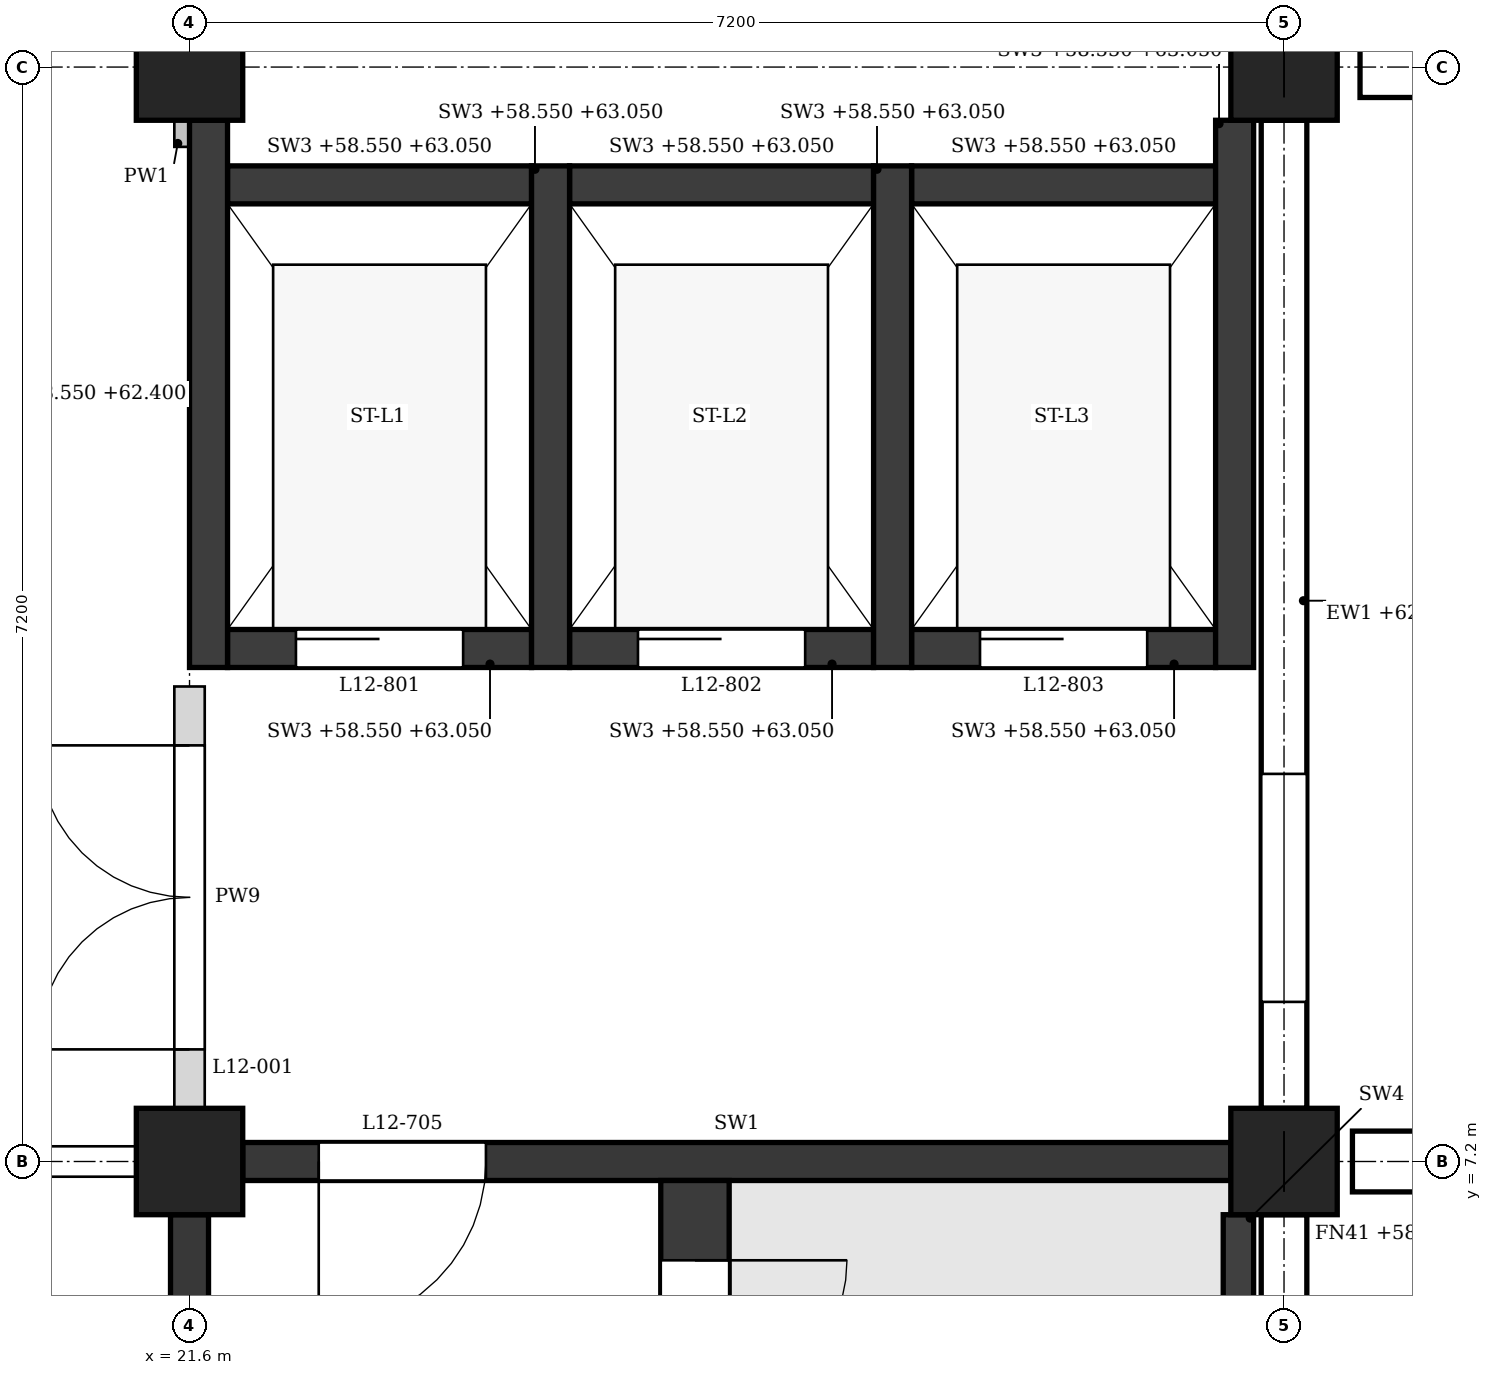
"""IFC4 building model, lengths in metres.
Left out: names, types, materials, properties, quantities, classifications, styles, units other than length and angle.
Written with IfcOpenShell. Run it as: python <this file> out.ifc"""

import sys

from ifc_helpers import new_model, si_unit, direction, frame, frame_2d, origin, origin_2d, place, context, subcontext, project, spatial, polyline, rectangle, outline, extrude, element, fill, save


model = new_model("IFC4")
c1 = context("Model", 3, precision=1e-05, world=origin(), true_north=direction((0.0, 1.0)))
c2 = subcontext(c1, "Body", "Model", "MODEL_VIEW")
j1 = project(units=[si_unit("LENGTHUNIT", "METRE"), si_unit("PLANEANGLEUNIT", "RADIAN")], contexts=[c1])
p1 = place(None, origin())
s1 = spatial("IfcSite", under=j1, at=p1, CompositionType="ELEMENT")
p2 = place(p1, origin())
s2 = spatial("IfcBuilding", under=s1, at=p2, CompositionType="ELEMENT")
p3 = place(p2, frame((0.0, 0.0, 58.8)))
s3 = spatial("IfcBuildingStorey", under=s2, at=p3, CompositionType="ELEMENT", Elevation=58.8)
for number, where, z_axis, x_axis in (
    (1, (21.6, 7.2, 0.0), (0.0, 0.0, 1.0), (1.0, 0.0, 0.0)),
    (2, (21.6, 14.4, 0.0), (0.0, 0.0, 1.0), (1.0, 0.0, 0.0)),
    (3, (28.8, 7.2, 0.0), (0.0, 0.0, 1.0), (1.0, 0.0, 0.0)),
    (4, (28.8, 14.4, 0.0), (0.0, 0.0, 1.0), (1.0, 0.0, 0.0)),
):
    element("IfcColumn", number, at=place(p3, frame(where, z_axis=z_axis, x_axis=x_axis)), inside=s3, PredefinedType="COLUMN", context=c2, shape_type="SweptSolid", body=[
        extrude(rectangle(XDim=0.7, YDim=0.7, at=origin_2d()), origin(), (0.0, 0.0, 1.0), 4.5),
    ])
p4 = place(p3, frame((28.8, 0.35, 0.0), z_axis=(0.0, 0.0, 1.0), x_axis=(0.0, 1.0, 0.0)))
e5 = element("IfcWall", 5, at=p4, inside=s3, PredefinedType="STANDARD", context=c2, shape_type="SweptSolid", body=[
    extrude(rectangle(XDim=6.5, YDim=0.3, at=frame_2d((3.25, 0.0))), origin(), (0.0, 0.0, 1.0), 3.65),
])
p5 = place(p4, frame((1.0, 0.0, 0.9)))
e6 = element("IfcOpeningElement", 6, at=p5, cuts=e5, PredefinedType="OPENING", context=c2, shape_type="SweptSolid", body=[
    extrude(outline(polyline([(0.0, 0.0), (0.9, 0.0), (0.9, 2.25), (0.45, 2.7), (0.0, 2.25), (0.0, 0.0)])), frame((0.0, 0.16, 0.0), z_axis=(0.0, -1.0, 0.0), x_axis=(1.0, 0.0, 0.0)), (0.0, 0.0, 1.0), 0.32),
])
p6 = place(p4, frame((4.6, 0.0, 0.9)))
e7 = element("IfcOpeningElement", 7, at=p6, cuts=e5, PredefinedType="OPENING", context=c2, shape_type="SweptSolid", body=[
    extrude(outline(polyline([(0.0, 0.0), (0.9, 0.0), (0.9, 2.25), (0.45, 2.7), (0.0, 2.25), (0.0, 0.0)])), frame((0.0, 0.16, 0.0), z_axis=(0.0, -1.0, 0.0), x_axis=(1.0, 0.0, 0.0)), (0.0, 0.0, 1.0), 0.32),
])
p7 = place(p3, frame((28.8, 7.55, 0.0), z_axis=(0.0, 0.0, 1.0), x_axis=(0.0, 1.0, 0.0)))
e8 = element("IfcWall", 8, at=p7, inside=s3, PredefinedType="STANDARD", context=c2, shape_type="SweptSolid", body=[
    extrude(rectangle(XDim=6.5, YDim=0.3, at=frame_2d((3.25, 0.0))), origin(), (0.0, 0.0, 1.0), 3.65),
])
p8 = place(p7, frame((0.7, 0.0, 0.9)))
e9 = element("IfcOpeningElement", 9, at=p8, cuts=e8, PredefinedType="OPENING", context=c2, shape_type="SweptSolid", body=[
    extrude(outline(polyline([(0.0, 0.0), (1.5, 0.0), (1.5, 1.95), (0.75, 2.7), (0.0, 1.95), (0.0, 0.0)])), frame((0.0, 0.16, 0.0), z_axis=(0.0, -1.0, 0.0), x_axis=(1.0, 0.0, 0.0)), (0.0, 0.0, 1.0), 0.32),
])
p9 = place(p3, frame((29.25, 7.2, -0.25), z_axis=(0.0, 0.0, 1.0), x_axis=(1.0, 0.0, 0.0)))
e10 = element("IfcWall", 10, at=p9, inside=s3, PredefinedType="POLYGONAL", context=c2, shape_type="SweptSolid", body=[
    extrude(outline(polyline([(0.5, 0.0), (0.5, 22.225), (0.15, 22.75), (0.0, 22.75), (0.0, 0.0), (0.5, 0.0)])), frame((0.0, 0.2, 0.0), z_axis=(0.0, -1.0, 0.0), x_axis=(1.0, 0.0, 0.0)), (0.0, 0.0, 1.0), 0.4),
])
p10 = place(p3, frame((29.3, 14.4, -0.25), z_axis=(0.0, 0.0, 1.0), x_axis=(1.0, 0.0, 0.0)))
e11 = element("IfcWall", 11, at=p10, inside=s3, PredefinedType="POLYGONAL", context=c2, shape_type="SweptSolid", body=[
    extrude(outline(polyline([(0.5, 0.0), (0.5, 23.85), (0.0, 23.85), (0.0, 0.0), (0.5, 0.0)])), frame((0.0, 0.2, 0.0), z_axis=(0.0, -1.0, 0.0), x_axis=(1.0, 0.0, 0.0)), (0.0, 0.0, 1.0), 0.4),
])
p11 = place(p3, frame((21.95, 7.2, 0.0), z_axis=(0.0, 0.0, 1.0), x_axis=(1.0, 0.0, 0.0)))
e12 = element("IfcWall", 12, at=p11, inside=s3, PredefinedType="SHEAR", context=c2, shape_type="SweptSolid", body=[
    extrude(rectangle(XDim=6.5, YDim=0.25, at=frame_2d((3.25, 0.0))), origin(), (0.0, 0.0, 1.0), 3.6),
])
p12 = place(p11, frame((0.5, 0.0, 0.0)))
e13 = element("IfcOpeningElement", 13, at=p12, cuts=e12, PredefinedType="OPENING", context=c2, shape_type="SweptSolid", body=[
    extrude(rectangle(XDim=1.1, YDim=2.1, at=frame_2d((0.55, 1.05))), frame((0.0, 0.135, 0.0), z_axis=(0.0, -1.0, 0.0), x_axis=(1.0, 0.0, 0.0)), (0.0, 0.0, 1.0), 0.27),
])
p13 = place(p3, frame((21.6, 0.35, 0.0), z_axis=(0.0, 0.0, 1.0), x_axis=(0.0, 1.0, 0.0)))
e14 = element("IfcWall", 14, at=p13, inside=s3, PredefinedType="SHEAR", context=c2, shape_type="SweptSolid", body=[
    extrude(rectangle(XDim=6.5, YDim=0.25, at=frame_2d((3.25, 0.0))), origin(), (0.0, 0.0, 1.0), 3.6),
])
p14 = place(p3, frame((28.5, 5.85, -0.25), z_axis=(0.0, 0.0, 1.0), x_axis=(0.0, 1.0, 0.0)))
e15 = element("IfcWall", 15, at=p14, inside=s3, PredefinedType="SHEAR", context=c2, shape_type="SweptSolid", body=[
    extrude(rectangle(XDim=1.0, YDim=0.2, at=frame_2d((0.5, 0.0))), origin(), (0.0, 0.0, 1.0), 4.5),
])
p15 = place(p3, frame((24.925, 0.15, 0.0), z_axis=(0.0, 0.0, 1.0), x_axis=(0.0, 1.0, 0.0)))
e16 = element("IfcWall", 16, at=p15, inside=s3, PredefinedType="SHEAR", context=c2, shape_type="SweptSolid", body=[
    extrude(rectangle(XDim=6.925, YDim=0.45, at=frame_2d((3.462, 0.0))), origin(), (0.0, 0.0, 1.0), 4.25),
])
p16 = place(p15, frame((5.4, 0.0, 0.0)))
e17 = element("IfcOpeningElement", 17, at=p16, cuts=e16, PredefinedType="OPENING", context=c2, shape_type="SweptSolid", body=[
    extrude(rectangle(XDim=1.0, YDim=2.1, at=frame_2d((0.5, 1.05))), frame((0.0, 0.235, 0.0), z_axis=(0.0, -1.0, 0.0), x_axis=(1.0, 0.0, 0.0)), (0.0, 0.0, 1.0), 0.47),
])
p17 = place(p3, frame((21.725, 10.45, -0.25), z_axis=(0.0, 0.0, 1.0), x_axis=(0.0, 1.0, 0.0)))
e18 = element("IfcWall", 18, at=p17, inside=s3, PredefinedType="SHEAR", context=c2, shape_type="SweptSolid", body=[
    extrude(rectangle(XDim=3.6, YDim=0.25, at=frame_2d((1.8, 0.0))), origin(), (0.0, 0.0, 1.0), 3.85),
])
for number, where, z_axis, x_axis in (
    (19, (23.975, 10.45, -0.25), (0.0, 0.0, 1.0), (0.0, 1.0, 0.0)),
    (20, (26.225, 10.45, -0.25), (0.0, 0.0, 1.0), (0.0, 1.0, 0.0)),
):
    element("IfcWall", number, at=place(p3, frame(where, z_axis=z_axis, x_axis=x_axis)), inside=s3, PredefinedType="SHEAR", context=c2, shape_type="SweptSolid", body=[
        extrude(rectangle(XDim=3.3, YDim=0.25, at=frame_2d((1.65, 0.0))), origin(), (0.0, 0.0, 1.0), 4.5),
    ])
p18 = place(p3, frame((28.475, 10.45, -0.25), z_axis=(0.0, 0.0, 1.0), x_axis=(0.0, 1.0, 0.0)))
e21 = element("IfcWall", 21, at=p18, inside=s3, PredefinedType="SHEAR", context=c2, shape_type="SweptSolid", body=[
    extrude(rectangle(XDim=3.6, YDim=0.25, at=frame_2d((1.8, 0.0))), origin(), (0.0, 0.0, 1.0), 4.5),
])
p19 = place(p3, frame((21.85, 10.575, -0.25), z_axis=(0.0, 0.0, 1.0), x_axis=(1.0, 0.0, 0.0)))
e22 = element("IfcWall", 22, at=p19, inside=s3, PredefinedType="SHEAR", context=c2, shape_type="SweptSolid", body=[
    extrude(rectangle(XDim=2.0, YDim=0.25, at=frame_2d((1.0, 0.0))), origin(), (0.0, 0.0, 1.0), 4.5),
])
p20 = place(p19, frame((0.45, 0.0, 0.25)))
e23 = element("IfcOpeningElement", 23, at=p20, cuts=e22, PredefinedType="OPENING", context=c2, shape_type="SweptSolid", body=[
    extrude(rectangle(XDim=1.1, YDim=2.1, at=frame_2d((0.55, 1.05))), frame((0.0, 0.135, 0.0), z_axis=(0.0, -1.0, 0.0), x_axis=(1.0, 0.0, 0.0)), (0.0, 0.0, 1.0), 0.27),
])
p21 = place(p3, frame((21.85, 13.625, -0.25), z_axis=(0.0, 0.0, 1.0), x_axis=(1.0, 0.0, 0.0)))
e24 = element("IfcWall", 24, at=p21, inside=s3, PredefinedType="SHEAR", context=c2, shape_type="SweptSolid", body=[
    extrude(rectangle(XDim=2.0, YDim=0.25, at=frame_2d((1.0, 0.0))), origin(), (0.0, 0.0, 1.0), 4.5),
])
p22 = place(p3, frame((24.1, 10.575, -0.25), z_axis=(0.0, 0.0, 1.0), x_axis=(1.0, 0.0, 0.0)))
e25 = element("IfcWall", 25, at=p22, inside=s3, PredefinedType="SHEAR", context=c2, shape_type="SweptSolid", body=[
    extrude(rectangle(XDim=2.0, YDim=0.25, at=frame_2d((1.0, 0.0))), origin(), (0.0, 0.0, 1.0), 4.5),
])
p23 = place(p22, frame((0.45, 0.0, 0.25)))
e26 = element("IfcOpeningElement", 26, at=p23, cuts=e25, PredefinedType="OPENING", context=c2, shape_type="SweptSolid", body=[
    extrude(rectangle(XDim=1.1, YDim=2.1, at=frame_2d((0.55, 1.05))), frame((0.0, 0.135, 0.0), z_axis=(0.0, -1.0, 0.0), x_axis=(1.0, 0.0, 0.0)), (0.0, 0.0, 1.0), 0.27),
])
p24 = place(p3, frame((24.1, 13.625, -0.25), z_axis=(0.0, 0.0, 1.0), x_axis=(1.0, 0.0, 0.0)))
e27 = element("IfcWall", 27, at=p24, inside=s3, PredefinedType="SHEAR", context=c2, shape_type="SweptSolid", body=[
    extrude(rectangle(XDim=2.0, YDim=0.25, at=frame_2d((1.0, 0.0))), origin(), (0.0, 0.0, 1.0), 4.5),
])
p25 = place(p3, frame((26.35, 10.575, -0.25), z_axis=(0.0, 0.0, 1.0), x_axis=(1.0, 0.0, 0.0)))
e28 = element("IfcWall", 28, at=p25, inside=s3, PredefinedType="SHEAR", context=c2, shape_type="SweptSolid", body=[
    extrude(rectangle(XDim=2.0, YDim=0.25, at=frame_2d((1.0, 0.0))), origin(), (0.0, 0.0, 1.0), 4.5),
])
p26 = place(p25, frame((0.45, 0.0, 0.25)))
e29 = element("IfcOpeningElement", 29, at=p26, cuts=e28, PredefinedType="OPENING", context=c2, shape_type="SweptSolid", body=[
    extrude(rectangle(XDim=1.1, YDim=2.1, at=frame_2d((0.55, 1.05))), frame((0.0, 0.135, 0.0), z_axis=(0.0, -1.0, 0.0), x_axis=(1.0, 0.0, 0.0)), (0.0, 0.0, 1.0), 0.27),
])
p27 = place(p3, frame((26.35, 13.625, -0.25), z_axis=(0.0, 0.0, 1.0), x_axis=(1.0, 0.0, 0.0)))
e30 = element("IfcWall", 30, at=p27, inside=s3, PredefinedType="SHEAR", context=c2, shape_type="SweptSolid", body=[
    extrude(rectangle(XDim=2.0, YDim=0.25, at=frame_2d((1.0, 0.0))), origin(), (0.0, 0.0, 1.0), 4.5),
])
p28 = place(p3, frame((14.75, 7.2, 0.0), z_axis=(0.0, 0.0, 1.0), x_axis=(1.0, 0.0, 0.0)))
e31 = element("IfcWall", 31, at=p28, inside=s3, PredefinedType="PARTITIONING", context=c2, shape_type="SweptSolid", body=[
    extrude(rectangle(XDim=6.5, YDim=0.2, at=frame_2d((3.25, 0.0))), origin(), (0.0, 0.0, 1.0), 3.6),
])
p29 = place(p28, frame((4.375, 0.0, 0.0)))
e32 = element("IfcOpeningElement", 32, at=p29, cuts=e31, PredefinedType="OPENING", context=c2, shape_type="SweptSolid", body=[
    extrude(rectangle(XDim=1.0, YDim=2.1, at=frame_2d((0.5, 1.05))), frame((0.0, 0.11, 0.0), z_axis=(0.0, -1.0, 0.0), x_axis=(1.0, 0.0, 0.0)), (0.0, 0.0, 1.0), 0.22),
])
p30 = place(p3, frame((21.6, 7.55, 0.0), z_axis=(0.0, 0.0, 1.0), x_axis=(0.0, 1.0, 0.0)))
e33 = element("IfcWall", 33, at=p30, inside=s3, PredefinedType="PARTITIONING", context=c2, shape_type="SweptSolid", body=[
    extrude(rectangle(XDim=2.775, YDim=0.2, at=frame_2d((1.387, 0.0))), origin(), (0.0, 0.0, 1.0), 3.6),
])
p31 = place(p30, frame((0.387, 0.0, 0.0)))
e34 = element("IfcOpeningElement", 34, at=p31, cuts=e33, PredefinedType="OPENING", context=c2, shape_type="SweptSolid", body=[
    extrude(rectangle(XDim=2.0, YDim=2.4, at=frame_2d((1.0, 1.2))), frame((0.0, 0.11, 0.0), z_axis=(0.0, -1.0, 0.0), x_axis=(1.0, 0.0, 0.0)), (0.0, 0.0, 1.0), 0.22),
])
p32 = place(p3, frame((21.6, 13.875, 0.0), z_axis=(0.0, 0.0, 1.0), x_axis=(0.0, 1.0, 0.0)))
e35 = element("IfcWall", 35, at=p32, inside=s3, PredefinedType="PARTITIONING", context=c2, shape_type="SweptSolid", body=[
    extrude(rectangle(XDim=0.175, YDim=0.2, at=frame_2d((0.087, 0.0))), origin(), (0.0, 0.0, 1.0), 3.6),
])
p33 = place(p8, origin())
e36 = element("IfcWindow", 36, at=p33, inside=s3, PartitioningType="SINGLE_PANEL", PredefinedType="WINDOW", context=c2, shape_type="SweptSolid", body=[
    extrude(outline(polyline([(0.0, 0.0), (1.5, 0.0), (1.5, 1.95), (0.75, 2.7), (0.0, 1.95), (0.0, 0.0)])), frame((0.0, 0.03, 0.0), z_axis=(0.0, -1.0, 0.0), x_axis=(1.0, 0.0, 0.0)), (0.0, 0.0, 1.0), 0.06),
])
fill(e9, e36)
p34 = place(p16, frame((1.0, 0.0, 0.0), z_axis=(0.0, 0.0, 1.0), x_axis=(-1.0, 0.0, 0.0)))
e37 = element("IfcDoor", 37, at=p34, inside=s3, OperationType="SINGLE_SWING_LEFT", PredefinedType="DOOR", context=c2, shape_type="SweptSolid", body=[
    extrude(rectangle(XDim=1.0, YDim=2.1, at=frame_2d((0.5, 1.05))), frame((0.0, 0.025, 0.0), z_axis=(0.0, -1.0, 0.0), x_axis=(1.0, 0.0, 0.0)), (0.0, 0.0, 1.0), 0.05),
])
fill(e17, e37)
p35 = place(p12, frame((1.1, 0.0, 0.0), z_axis=(0.0, 0.0, 1.0), x_axis=(-1.0, 0.0, 0.0)))
e38 = element("IfcDoor", 38, at=p35, inside=s3, OperationType="SINGLE_SWING_RIGHT", PredefinedType="DOOR", context=c2, shape_type="SweptSolid", body=[
    extrude(rectangle(XDim=1.1, YDim=2.1, at=frame_2d((0.55, 1.05))), frame((0.0, 0.025, 0.0), z_axis=(0.0, -1.0, 0.0), x_axis=(1.0, 0.0, 0.0)), (0.0, 0.0, 1.0), 0.05),
])
fill(e13, e38)
p36 = place(p20, origin())
e39 = element("IfcDoor", 39, at=p36, inside=s3, OperationType="SLIDING_TO_LEFT", PredefinedType="DOOR", context=c2, shape_type="SweptSolid", body=[
    extrude(rectangle(XDim=1.1, YDim=2.1, at=frame_2d((0.55, 1.05))), frame((0.0, 0.025, 0.0), z_axis=(0.0, -1.0, 0.0), x_axis=(1.0, 0.0, 0.0)), (0.0, 0.0, 1.0), 0.05),
])
fill(e23, e39)
p37 = place(p23, origin())
e40 = element("IfcDoor", 40, at=p37, inside=s3, OperationType="SLIDING_TO_LEFT", PredefinedType="DOOR", context=c2, shape_type="SweptSolid", body=[
    extrude(rectangle(XDim=1.1, YDim=2.1, at=frame_2d((0.55, 1.05))), frame((0.0, 0.025, 0.0), z_axis=(0.0, -1.0, 0.0), x_axis=(1.0, 0.0, 0.0)), (0.0, 0.0, 1.0), 0.05),
])
fill(e26, e40)
p38 = place(p26, origin())
e41 = element("IfcDoor", 41, at=p38, inside=s3, OperationType="SLIDING_TO_LEFT", PredefinedType="DOOR", context=c2, shape_type="SweptSolid", body=[
    extrude(rectangle(XDim=1.1, YDim=2.1, at=frame_2d((0.55, 1.05))), frame((0.0, 0.025, 0.0), z_axis=(0.0, -1.0, 0.0), x_axis=(1.0, 0.0, 0.0)), (0.0, 0.0, 1.0), 0.05),
])
fill(e29, e41)
p39 = place(p31, origin())
e42 = element("IfcDoor", 42, at=p39, inside=s3, OperationType="DOUBLE_DOOR_SINGLE_SWING", PredefinedType="DOOR", context=c2, shape_type="SweptSolid", body=[
    extrude(rectangle(XDim=2.0, YDim=2.4, at=frame_2d((1.0, 1.2))), frame((0.0, 0.025, 0.0), z_axis=(0.0, -1.0, 0.0), x_axis=(1.0, 0.0, 0.0)), (0.0, 0.0, 1.0), 0.05),
])
fill(e34, e42)
save(model, sys.argv[1])
